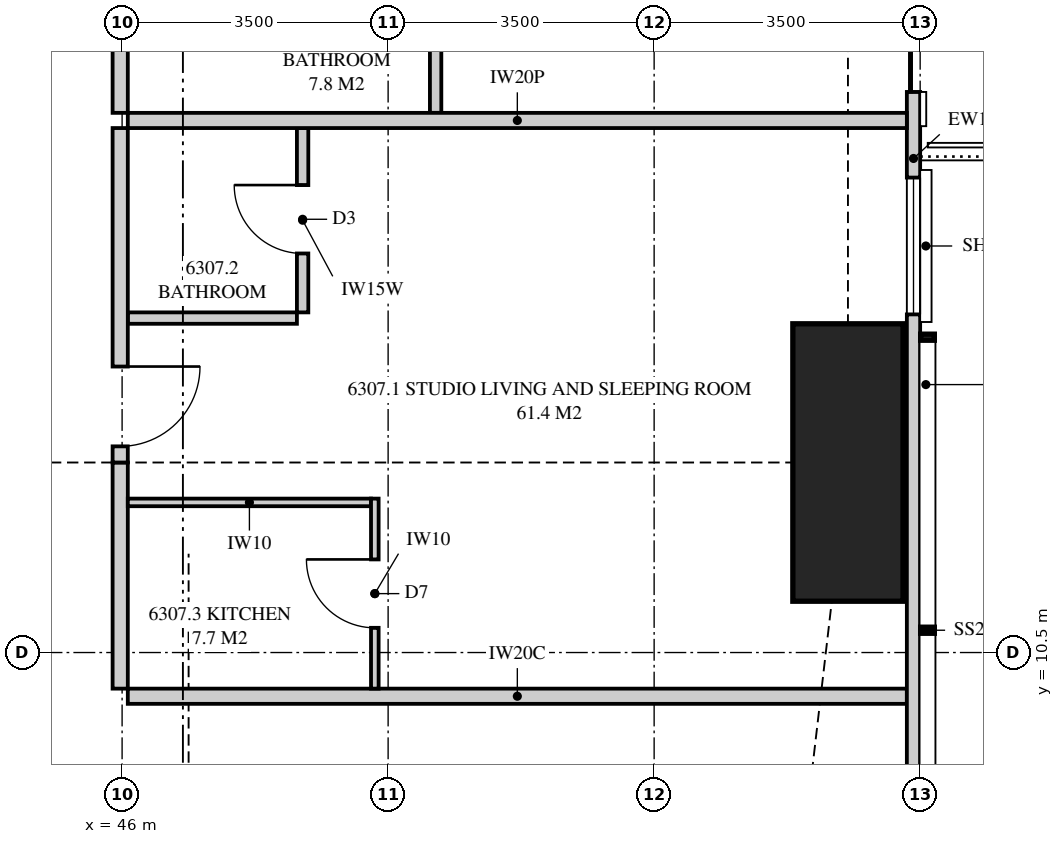
"""IFC4 building model, lengths in metres.
Left out: names, types, materials, properties, quantities, classifications, styles, units other than length and angle.
Written with IfcOpenShell. Run it as: python <this file> out.ifc"""

import sys

from ifc_helpers import new_model, si_unit, direction, frame, frame_2d, origin, origin_2d, place, context, subcontext, project, spatial, polyline, rectangle, outline, extrude, element, fill, save


model = new_model("IFC4")
c1 = context("Model", 3, precision=1e-05, world=origin(), true_north=direction((0.0, 1.0)))
c2 = subcontext(c1, "Body", "Model", "MODEL_VIEW")
j1 = project(units=[si_unit("LENGTHUNIT", "METRE"), si_unit("PLANEANGLEUNIT", "RADIAN")], contexts=[c1])
p1 = place(None, origin())
s1 = spatial("IfcSite", under=j1, at=p1, CompositionType="ELEMENT")
p2 = place(p1, origin())
s2 = spatial("IfcBuilding", under=s1, at=p2, CompositionType="ELEMENT")
p3 = place(p2, frame((0.0, 0.0, 231.95)))
s3 = spatial("IfcBuildingStorey", under=s2, at=p3, CompositionType="ELEMENT", Elevation=231.95)
p4 = place(p3, frame((55.55, 13.0, 0.0), z_axis=(0.0, 0.0, 1.0), x_axis=(1.0, 0.0, 0.0)))
e1 = element("IfcColumn", 1, at=p4, inside=s3, PredefinedType="COLUMN", context=c2, shape_type="SweptSolid", body=[
    extrude(rectangle(XDim=1.45, YDim=3.65, at=origin_2d()), origin(), (0.0, 0.0, 1.0), 3.5),
])
p5 = place(p3, frame((56.413, 3.051, 0.0), z_axis=(0.0, 0.0, 1.0), x_axis=(0.0, 1.0, 0.0)))
e2 = element("IfcWall", 2, at=p5, inside=s3, PredefinedType="SOLIDWALL", context=c2, shape_type="SweptSolid", body=[
    extrude(outline(polyline([(0.0, 0.0), (27.897, 0.0), (27.897, 3.26), (22.157, 3.26), (22.157, 2.3), (22.092, 2.3), (22.092, 3.26), (21.949, 3.26), (21.949, 2.3), (9.949, 2.3), (9.949, 3.26), (9.858, 3.26), (9.858, 2.3), (9.688, 2.3), (9.688, 3.26), (0.0, 3.26), (0.0, 0.0)])), frame((0.0, 0.087, 0.0), z_axis=(0.0, -1.0, 0.0), x_axis=(1.0, 0.0, 0.0)), (0.0, 0.0, 1.0), 0.175),
])
p6 = place(p5, frame((1.187, 0.0, 0.4)))
e3 = element("IfcOpeningElement", 3, at=p6, cuts=e2, PredefinedType="OPENING", context=c2, shape_type="SweptSolid", body=[
    extrude(rectangle(XDim=2.4, YDim=1.85, at=frame_2d((1.2, 0.925))), frame((0.0, 0.097, 0.0), z_axis=(0.0, -1.0, 0.0), x_axis=(1.0, 0.0, 0.0)), (0.0, 0.0, 1.0), 0.195),
])
p7 = place(p5, frame((11.897, 0.0, 0.4)))
e4 = element("IfcOpeningElement", 4, at=p7, cuts=e2, PredefinedType="OPENING", context=c2, shape_type="SweptSolid", body=[
    extrude(rectangle(XDim=1.8, YDim=1.85, at=frame_2d((0.9, 0.925))), frame((0.0, 0.097, 0.0), z_axis=(0.0, -1.0, 0.0), x_axis=(1.0, 0.0, 0.0)), (0.0, 0.0, 1.0), 0.195),
])
p8 = place(p5, frame((14.824, 0.0, 0.0)))
e5 = element("IfcOpeningElement", 5, at=p8, cuts=e2, PredefinedType="OPENING", context=c2, shape_type="SweptSolid", body=[
    extrude(rectangle(XDim=1.8, YDim=2.25, at=frame_2d((0.9, 1.125))), frame((0.0, 0.097, 0.0), z_axis=(0.0, -1.0, 0.0), x_axis=(1.0, 0.0, 0.0)), (0.0, 0.0, 1.0), 0.195),
])
p9 = place(p5, frame((18.224, 0.0, 0.4)))
e6 = element("IfcOpeningElement", 6, at=p9, cuts=e2, PredefinedType="OPENING", context=c2, shape_type="SweptSolid", body=[
    extrude(rectangle(XDim=1.8, YDim=1.85, at=frame_2d((0.9, 0.925))), frame((0.0, 0.097, 0.0), z_axis=(0.0, -1.0, 0.0), x_axis=(1.0, 0.0, 0.0)), (0.0, 0.0, 1.0), 0.195),
])
p10 = place(p3, frame((46.075, 9.925, 0.0), z_axis=(0.0, 0.0, 1.0), x_axis=(1.0, 0.0, 0.0)))
e7 = element("IfcWall", 7, at=p10, inside=s3, PredefinedType="PARTITIONING", context=c2, shape_type="SweptSolid", body=[
    extrude(outline(polyline([(0.0, 0.0), (10.25, 0.0), (10.25, 3.26), (10.033, 3.26), (10.033, 2.3), (8.201, 2.3), (8.201, 3.26), (2.11, 3.26), (2.11, 2.66), (0.0, 2.66), (0.0, 3.26), (0.0, 0.0)])), frame((0.0, 0.1, 0.0), z_axis=(0.0, -1.0, 0.0), x_axis=(1.0, 0.0, 0.0)), (0.0, 0.0, 1.0), 0.2),
])
p11 = place(p3, frame((56.325, 17.5, 0.0), z_axis=(0.0, 0.0, 1.0), x_axis=(-1.0, 0.0, 0.0)))
e8 = element("IfcWall", 8, at=p11, inside=s3, PredefinedType="PARTITIONING", context=c2, shape_type="SweptSolid", body=[
    extrude(outline(polyline([(0.0, 0.0), (10.25, 0.0), (10.25, 3.26), (10.25, 2.66), (1.685, 2.66), (1.685, 2.3), (0.0, 2.3), (0.0, 3.26), (0.0, 0.0)])), frame((0.0, 0.1, 0.0), z_axis=(0.0, -1.0, 0.0), x_axis=(1.0, 0.0, 0.0)), (0.0, 0.0, 1.0), 0.2),
])
p12 = place(p3, frame((45.975, 10.025, 0.0), z_axis=(0.0, 0.0, 1.0), x_axis=(0.0, 1.0, 0.0)))
e9 = element("IfcWall", 9, at=p12, inside=s3, PredefinedType="PARTITIONING", context=c2, shape_type="SweptSolid", body=[
    extrude(rectangle(XDim=2.975, YDim=0.2, at=frame_2d((1.488, 0.0))), origin(), (0.0, 0.0, 1.0), 2.66),
])
p13 = place(p3, frame((45.975, 13.0, 0.0), z_axis=(0.0, 0.0, 1.0), x_axis=(0.0, 1.0, 0.0)))
e10 = element("IfcWall", 10, at=p13, inside=s3, PredefinedType="PARTITIONING", context=c2, shape_type="SweptSolid", body=[
    extrude(outline(polyline([(0.0, 0.0), (4.4, 0.0), (4.4, 3.26), (1.31, 3.26), (1.31, 2.66), (0.0, 2.66), (0.0, 0.0)])), frame((0.0, 0.1, 0.0), z_axis=(0.0, -1.0, 0.0), x_axis=(1.0, 0.0, 0.0)), (0.0, 0.0, 1.0), 0.2),
])
p14 = place(p13, frame((0.212, 0.0, 0.0)))
e11 = element("IfcOpeningElement", 11, at=p14, cuts=e10, PredefinedType="OPENING", context=c2, shape_type="SweptSolid", body=[
    extrude(rectangle(XDim=1.05, YDim=2.2, at=frame_2d((0.525, 1.1))), frame((0.0, 0.11, 0.0), z_axis=(0.0, -1.0, 0.0), x_axis=(1.0, 0.0, 0.0)), (0.0, 0.0, 1.0), 0.22),
])
p15 = place(p3, frame((48.375, 14.975, 0.0), z_axis=(0.0, 0.0, 1.0), x_axis=(0.0, 1.0, 0.0)))
e12 = element("IfcWall", 12, at=p15, inside=s3, PredefinedType="PLUMBINGWALL", context=c2, shape_type="SweptSolid", body=[
    extrude(rectangle(XDim=2.425, YDim=0.15, at=frame_2d((1.212, 0.0))), origin(), (0.0, 0.0, 1.0), 3.26),
])
p16 = place(p15, frame((0.775, 0.0, 0.0)))
e13 = element("IfcOpeningElement", 13, at=p16, cuts=e12, PredefinedType="OPENING", context=c2, shape_type="SweptSolid", body=[
    extrude(rectangle(XDim=0.9, YDim=2.1, at=frame_2d((0.45, 1.05))), frame((0.0, 0.085, 0.0), z_axis=(0.0, -1.0, 0.0), x_axis=(1.0, 0.0, 0.0)), (0.0, 0.0, 1.0), 0.17),
])
p17 = place(p3, frame((48.3, 14.9, 0.0), z_axis=(0.0, 0.0, 1.0), x_axis=(-1.0, 0.0, 0.0)))
e14 = element("IfcWall", 14, at=p17, inside=s3, PredefinedType="PLUMBINGWALL", context=c2, shape_type="SweptSolid", body=[
    extrude(rectangle(XDim=2.225, YDim=0.15, at=frame_2d((1.113, 0.0))), origin(), (0.0, 0.0, 1.0), 3.26),
])
p18 = place(p3, frame((45.975, 17.6, 0.0), z_axis=(0.0, 0.0, 1.0), x_axis=(0.0, 1.0, 0.0)))
e15 = element("IfcWall", 15, at=p18, inside=s3, PredefinedType="PARTITIONING", context=c2, shape_type="SweptSolid", body=[
    extrude(outline(polyline([(0.0, 0.0), (7.4, 0.0), (7.4, 2.66), (6.09, 2.66), (6.09, 3.26), (2.46, 3.26), (2.46, 2.66), (0.0, 2.66), (0.0, 0.0)])), frame((0.0, 0.1, 0.0), z_axis=(0.0, -1.0, 0.0), x_axis=(1.0, 0.0, 0.0)), (0.0, 0.0, 1.0), 0.2),
])
p19 = place(p18, frame((4.188, 0.0, 0.0)))
e16 = element("IfcOpeningElement", 16, at=p19, cuts=e15, PredefinedType="OPENING", context=c2, shape_type="SweptSolid", body=[
    extrude(rectangle(XDim=1.05, YDim=2.2, at=frame_2d((0.525, 1.1))), frame((0.0, 0.11, 0.0), z_axis=(0.0, -1.0, 0.0), x_axis=(1.0, 0.0, 0.0)), (0.0, 0.0, 1.0), 0.22),
])
p20 = place(p3, frame((50.125, 17.6, 0.0), z_axis=(0.0, 0.0, 1.0), x_axis=(0.0, 1.0, 0.0)))
e17 = element("IfcWall", 17, at=p20, inside=s3, PredefinedType="PLUMBINGWALL", context=c2, shape_type="SweptSolid", body=[
    extrude(outline(polyline([(0.0, 0.0), (3.15, 0.0), (3.15, 3.26), (2.435, 3.26), (2.435, 2.66), (0.0, 2.66), (0.0, 3.26), (0.0, 0.0)])), frame((0.0, 0.075, 0.0), z_axis=(0.0, -1.0, 0.0), x_axis=(1.0, 0.0, 0.0)), (0.0, 0.0, 1.0), 0.15),
])
p21 = place(p20, frame((1.85, 0.0, 0.0)))
e18 = element("IfcOpeningElement", 18, at=p21, cuts=e17, PredefinedType="OPENING", context=c2, shape_type="SweptSolid", body=[
    extrude(rectangle(XDim=0.9, YDim=2.1, at=frame_2d((0.45, 1.05))), frame((0.0, 0.085, 0.0), z_axis=(0.0, -1.0, 0.0), x_axis=(1.0, 0.0, 0.0)), (0.0, 0.0, 1.0), 0.17),
])
p22 = place(p3, frame((49.325, 10.025, 0.0), z_axis=(0.0, 0.0, 1.0), x_axis=(0.0, 1.0, 0.0)))
e19 = element("IfcWall", 19, at=p22, inside=s3, PredefinedType="PARTITIONING", context=c2, shape_type="SweptSolid", body=[
    extrude(outline(polyline([(0.0, 0.0), (2.5, 0.0), (2.5, 3.26), (2.5, 2.66), (1.715, 2.66), (1.715, 3.26), (0.0, 3.26), (0.0, 0.0)])), frame((0.0, 0.05, 0.0), z_axis=(0.0, -1.0, 0.0), x_axis=(1.0, 0.0, 0.0)), (0.0, 0.0, 1.0), 0.1),
])
p23 = place(p22, frame((0.8, 0.0, 0.0)))
e20 = element("IfcOpeningElement", 20, at=p23, cuts=e19, PredefinedType="OPENING", context=c2, shape_type="SweptSolid", body=[
    extrude(rectangle(XDim=0.9, YDim=2.1, at=frame_2d((0.45, 1.05))), frame((0.0, 0.06, 0.0), z_axis=(0.0, -1.0, 0.0), x_axis=(1.0, 0.0, 0.0)), (0.0, 0.0, 1.0), 0.12),
])
p24 = place(p3, frame((46.075, 12.475, 0.0), z_axis=(0.0, 0.0, 1.0), x_axis=(1.0, 0.0, 0.0)))
e21 = element("IfcWall", 21, at=p24, inside=s3, PredefinedType="PARTITIONING", context=c2, shape_type="SweptSolid", body=[
    extrude(outline(polyline([(0.0, 0.0), (3.2, 0.0), (3.2, 3.26), (3.2, 2.66), (2.06, 2.66), (0.0, 2.66), (0.0, 3.26), (0.0, 0.0)])), frame((0.0, 0.05, 0.0), z_axis=(0.0, -1.0, 0.0), x_axis=(1.0, 0.0, 0.0)), (0.0, 0.0, 1.0), 0.1),
])
p25 = place(p7, origin())
e22 = element("IfcWindow", 22, at=p25, inside=s3, PartitioningType="SINGLE_PANEL", PredefinedType="WINDOW", context=c2, shape_type="SweptSolid", body=[
    extrude(rectangle(XDim=1.8, YDim=1.85, at=frame_2d((0.9, 0.925))), frame((0.0, 0.03, 0.0), z_axis=(0.0, -1.0, 0.0), x_axis=(1.0, 0.0, 0.0)), (0.0, 0.0, 1.0), 0.06),
])
fill(e4, e22)
p26 = place(p8, origin())
e23 = element("IfcDoor", 23, at=p26, inside=s3, OperationType="SLIDING_TO_LEFT", PredefinedType="DOOR", context=c2, shape_type="SweptSolid", body=[
    extrude(rectangle(XDim=1.8, YDim=2.25, at=frame_2d((0.9, 1.125))), frame((0.0, 0.025, 0.0), z_axis=(0.0, -1.0, 0.0), x_axis=(1.0, 0.0, 0.0)), (0.0, 0.0, 1.0), 0.05),
])
fill(e5, e23)
p27 = place(p14, frame((1.05, 0.0, 0.0), z_axis=(0.0, 0.0, 1.0), x_axis=(-1.0, 0.0, 0.0)))
e24 = element("IfcDoor", 24, at=p27, inside=s3, OperationType="SINGLE_SWING_LEFT", PredefinedType="DOOR", context=c2, shape_type="SweptSolid", body=[
    extrude(rectangle(XDim=1.05, YDim=2.2, at=frame_2d((0.525, 1.1))), frame((0.0, 0.025, 0.0), z_axis=(0.0, -1.0, 0.0), x_axis=(1.0, 0.0, 0.0)), (0.0, 0.0, 1.0), 0.05),
])
fill(e11, e24)
p28 = place(p16, origin())
e25 = element("IfcDoor", 25, at=p28, inside=s3, OperationType="SINGLE_SWING_RIGHT", PredefinedType="DOOR", context=c2, shape_type="SweptSolid", body=[
    extrude(rectangle(XDim=0.9, YDim=2.1, at=frame_2d((0.45, 1.05))), frame((0.0, 0.025, 0.0), z_axis=(0.0, -1.0, 0.0), x_axis=(1.0, 0.0, 0.0)), (0.0, 0.0, 1.0), 0.05),
])
fill(e13, e25)
p29 = place(p23, origin())
e26 = element("IfcDoor", 26, at=p29, inside=s3, OperationType="SINGLE_SWING_RIGHT", PredefinedType="DOOR", context=c2, shape_type="SweptSolid", body=[
    extrude(rectangle(XDim=0.9, YDim=2.1, at=frame_2d((0.45, 1.05))), frame((0.0, 0.025, 0.0), z_axis=(0.0, -1.0, 0.0), x_axis=(1.0, 0.0, 0.0)), (0.0, 0.0, 1.0), 0.05),
])
fill(e20, e26)
save(model, sys.argv[1])
